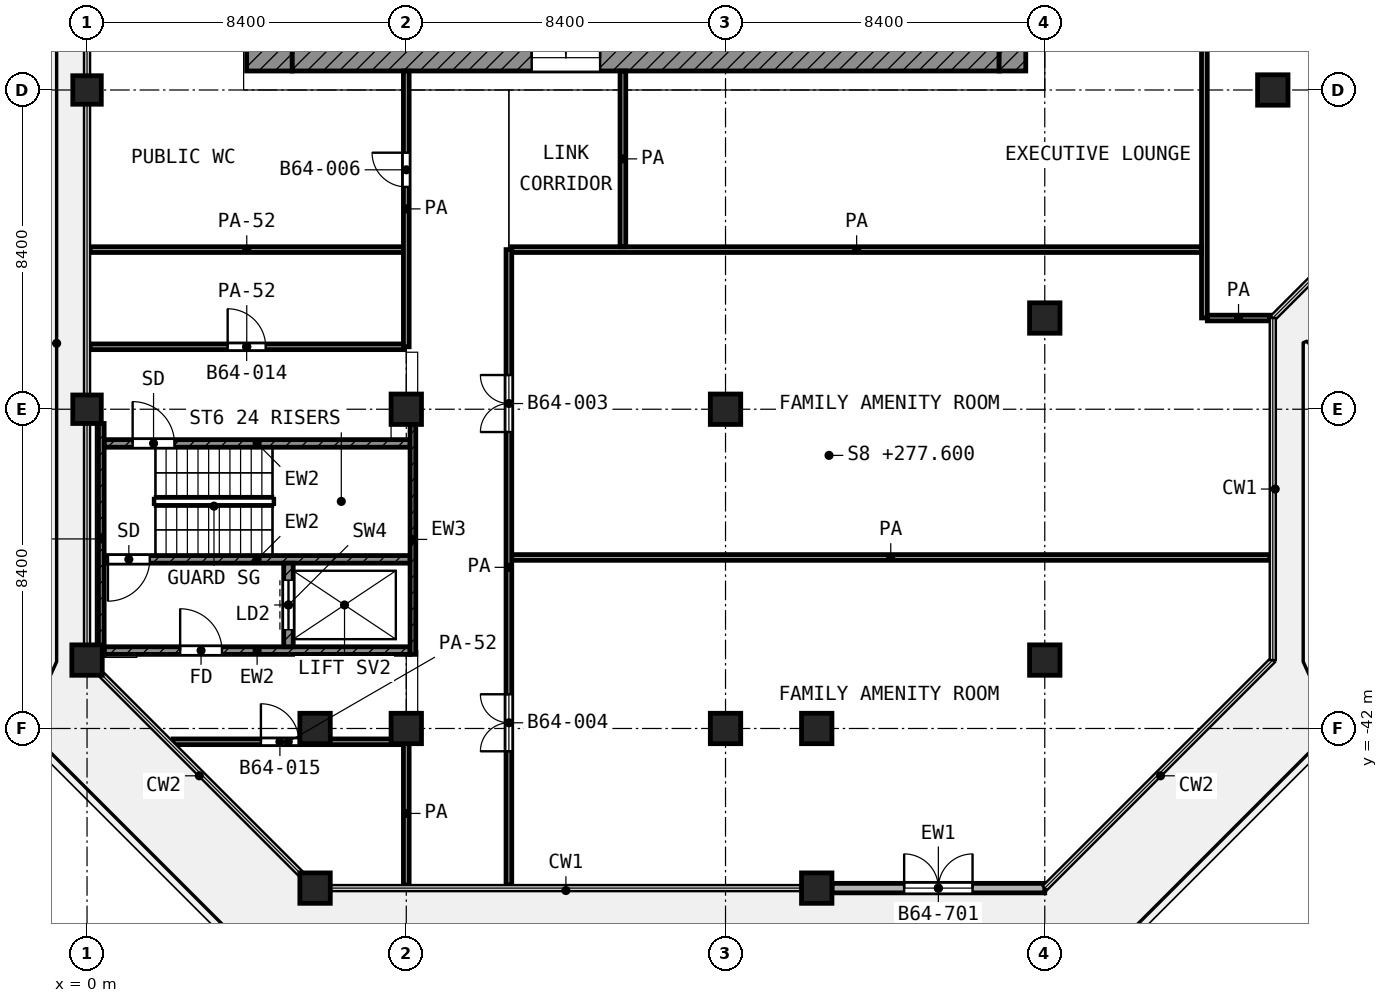
"""IFC4 building model, lengths in metres.
Left out: names, types, materials, properties, quantities, classifications, styles, units other than length and angle.
Written with IfcOpenShell. Run it as: python <this file> out.ifc"""

import sys

from ifc_helpers import new_model, si_unit, direction, frame, frame_2d, origin, origin_2d, place, context, subcontext, project, spatial, rectangle, extrude, element, fill, save


model = new_model("IFC4")
c1 = context("Model", 3, precision=1e-05, world=origin(), true_north=direction((0.0, 1.0)))
c2 = subcontext(c1, "Body", "Model", "MODEL_VIEW")
j1 = project(units=[si_unit("LENGTHUNIT", "METRE"), si_unit("PLANEANGLEUNIT", "RADIAN")], contexts=[c1])
p1 = place(None, origin())
s1 = spatial("IfcSite", under=j1, at=p1, CompositionType="ELEMENT")
p2 = place(p1, origin())
s2 = spatial("IfcBuilding", under=s1, at=p2, CompositionType="ELEMENT")
p3 = place(p2, frame((0.0, 0.0, 277.6)))
s3 = spatial("IfcBuildingStorey", under=s2, at=p3, CompositionType="ELEMENT", Elevation=277.6)
p4 = place(p3, frame((0.0, -25.2, 0.0), z_axis=(0.0, 0.0, 1.0), x_axis=(1.0, 0.0, 0.0)))
e1 = element("IfcColumn", 1, at=p4, inside=s3, PredefinedType="COLUMN", context=c2, shape_type="SweptSolid", body=[
    extrude(rectangle(XDim=0.75, YDim=0.75, at=origin_2d()), origin(), (0.0, 0.0, 1.0), 4.2),
])
for number, where, z_axis, x_axis in (
    (2, (31.2, -25.2, 0.0), (0.0, 0.0, 1.0), (1.0, 0.0, 0.0)),
    (3, (25.2, -31.2, 0.0), (0.0, 0.0, 1.0), (1.0, 0.0, 0.0)),
):
    element("IfcColumn", number, at=place(p3, frame(where, z_axis=z_axis, x_axis=x_axis)), inside=s3, PredefinedType="COLUMN", context=c2, shape_type="SweptSolid", body=[
        extrude(rectangle(XDim=0.8, YDim=0.8, at=origin_2d()), origin(), (0.0, 0.0, 1.0), 4.2),
    ])
p5 = place(p3, frame((0.0, -33.6, 0.0), z_axis=(0.0, 0.0, 1.0), x_axis=(1.0, 0.0, 0.0)))
e4 = element("IfcColumn", 4, at=p5, inside=s3, PredefinedType="COLUMN", context=c2, shape_type="SweptSolid", body=[
    extrude(rectangle(XDim=0.75, YDim=0.75, at=origin_2d()), origin(), (0.0, 0.0, 1.0), 4.2),
])
for number, where, z_axis, x_axis in (
    (5, (8.4, -33.6, 0.0), (0.0, 0.0, 1.0), (1.0, 0.0, 0.0)),
    (6, (16.8, -33.6, 0.0), (0.0, 0.0, 1.0), (1.0, 0.0, 0.0)),
    (7, (0.0, -40.2, 0.0), (0.0, 0.0, 1.0), (1.0, 0.0, 0.0)),
    (8, (25.2, -40.2, 0.0), (0.0, 0.0, 1.0), (1.0, 0.0, 0.0)),
    (9, (6.0, -42.0, 0.0), (0.0, 0.0, 1.0), (1.0, 0.0, 0.0)),
    (10, (8.4, -42.0, 0.0), (0.0, 0.0, 1.0), (1.0, 0.0, 0.0)),
    (11, (16.8, -42.0, 0.0), (0.0, 0.0, 1.0), (1.0, 0.0, 0.0)),
    (12, (19.2, -42.0, 0.0), (0.0, 0.0, 1.0), (1.0, 0.0, 0.0)),
    (13, (6.0, -46.2, 0.0), (0.0, 0.0, 1.0), (1.0, 0.0, 0.0)),
    (14, (19.2, -46.2, 0.0), (0.0, 0.0, 1.0), (1.0, 0.0, 0.0)),
):
    element("IfcColumn", number, at=place(p3, frame(where, z_axis=z_axis, x_axis=x_axis)), inside=s3, PredefinedType="COLUMN", context=c2, shape_type="SweptSolid", body=[
        extrude(rectangle(XDim=0.8, YDim=0.8, at=origin_2d()), origin(), (0.0, 0.0, 1.0), 4.2),
    ])
p6 = place(p3, frame((19.6, -46.2, 0.0), z_axis=(0.0, 0.0, 1.0), x_axis=(1.0, 0.0, 0.0)))
e15 = element("IfcWall", 15, at=p6, inside=s3, PredefinedType="SOLIDWALL", context=c2, shape_type="SweptSolid", body=[
    extrude(rectangle(XDim=5.6, YDim=0.25, at=frame_2d((2.8, 0.0))), origin(), (0.0, 0.0, 1.0), 3.48),
])
p7 = place(p6, frame((1.9, 0.0, 0.0)))
e16 = element("IfcOpeningElement", 16, at=p7, cuts=e15, PredefinedType="OPENING", context=c2, shape_type="SweptSolid", body=[
    extrude(rectangle(XDim=1.8, YDim=2.1, at=frame_2d((0.9, 1.05))), frame((0.0, 0.135, 0.0), z_axis=(0.0, -1.0, 0.0), x_axis=(1.0, 0.0, 0.0)), (0.0, 0.0, 1.0), 0.27),
])
p8 = place(p3, frame((4.8, -24.7, 0.0), z_axis=(0.0, 0.0, 1.0), x_axis=(0.0, 1.0, 0.0)))
e17 = element("IfcWall", 17, at=p8, inside=s3, PredefinedType="SHEAR", context=c2, shape_type="SweptSolid", body=[
    extrude(rectangle(XDim=19.3, YDim=1.2, at=frame_2d((9.65, 0.0))), origin(), (0.0, 0.0, 1.0), 3.6),
])
p9 = place(p8, frame((11.15, 0.0, 0.0)))
e18 = element("IfcOpeningElement", 18, at=p9, cuts=e17, PredefinedType="OPENING", context=c2, shape_type="SweptSolid", body=[
    extrude(rectangle(XDim=1.1, YDim=2.1, at=frame_2d((0.55, 1.05))), frame((0.0, 0.61, 0.0), z_axis=(0.0, -1.0, 0.0), x_axis=(1.0, 0.0, 0.0)), (0.0, 0.0, 1.0), 1.22),
])
p10 = place(p8, frame((1.85, 0.0, 0.0)))
e19 = element("IfcOpeningElement", 19, at=p10, cuts=e17, PredefinedType="OPENING", context=c2, shape_type="SweptSolid", body=[
    extrude(rectangle(XDim=1.1, YDim=2.1, at=frame_2d((0.55, 1.05))), frame((0.0, 0.61, 0.0), z_axis=(0.0, -1.0, 0.0), x_axis=(1.0, 0.0, 0.0)), (0.0, 0.0, 1.0), 1.22),
])
p11 = place(p3, frame((5.4, -24.35, 0.0), z_axis=(0.0, 0.0, 1.0), x_axis=(1.0, 0.0, 0.0)))
e20 = element("IfcWall", 20, at=p11, inside=s3, PredefinedType="SHEAR", context=c2, shape_type="SweptSolid", body=[
    extrude(rectangle(XDim=18.6, YDim=0.7, at=frame_2d((9.3, 0.0))), origin(), (0.0, 0.0, 1.0), 3.6),
])
p12 = place(p11, frame((6.3, 0.0, 0.0)))
e21 = element("IfcOpeningElement", 21, at=p12, cuts=e20, PredefinedType="OPENING", context=c2, shape_type="SweptSolid", body=[
    extrude(rectangle(XDim=1.8, YDim=2.1, at=frame_2d((0.9, 1.05))), frame((0.0, 0.36, 0.0), z_axis=(0.0, -1.0, 0.0), x_axis=(1.0, 0.0, 0.0)), (0.0, 0.0, 1.0), 0.72),
])
p13 = place(p3, frame((24.35, -24.7, 0.0), z_axis=(0.0, 0.0, 1.0), x_axis=(0.0, 1.0, 0.0)))
e22 = element("IfcWall", 22, at=p13, inside=s3, PredefinedType="SHEAR", context=c2, shape_type="SweptSolid", body=[
    extrude(rectangle(XDim=0.7, YDim=0.7, at=frame_2d((0.35, 0.0))), origin(), (0.0, 0.0, 1.0), 3.6),
])
p14 = place(p3, frame((0.375, -40.05, 0.0), z_axis=(0.0, 0.0, 1.0), x_axis=(0.0, 1.0, 0.0)))
e23 = element("IfcWall", 23, at=p14, inside=s3, PredefinedType="SHEAR", context=c2, shape_type="SweptSolid", body=[
    extrude(rectangle(XDim=6.075, YDim=0.15, at=frame_2d((3.038, 0.0))), origin(), (0.0, 0.0, 1.0), 3.6),
])
p15 = place(p3, frame((8.575, -40.05, 0.0), z_axis=(0.0, 0.0, 1.0), x_axis=(0.0, 1.0, 0.0)))
e24 = element("IfcWall", 24, at=p15, inside=s3, PredefinedType="SHEAR", context=c2, shape_type="SweptSolid", body=[
    extrude(rectangle(XDim=6.05, YDim=0.15, at=frame_2d((3.025, 0.0))), origin(), (0.0, 0.0, 1.0), 3.6),
])
p16 = place(p3, frame((0.45, -34.5, 0.0), z_axis=(0.0, 0.0, 1.0), x_axis=(1.0, 0.0, 0.0)))
e25 = element("IfcWall", 25, at=p16, inside=s3, PredefinedType="SHEAR", context=c2, shape_type="SweptSolid", body=[
    extrude(rectangle(XDim=8.05, YDim=0.2, at=frame_2d((4.025, 0.0))), origin(), (0.0, 0.0, 1.0), 3.6),
])
p17 = place(p16, frame((0.75, 0.0, 0.0)))
e26 = element("IfcOpeningElement", 26, at=p17, cuts=e25, PredefinedType="OPENING", context=c2, shape_type="SweptSolid", body=[
    extrude(rectangle(XDim=1.1, YDim=2.1, at=frame_2d((0.55, 1.05))), frame((0.0, 0.11, 0.0), z_axis=(0.0, -1.0, 0.0), x_axis=(1.0, 0.0, 0.0)), (0.0, 0.0, 1.0), 0.22),
])
p18 = place(p3, frame((0.45, -37.55, 0.0), z_axis=(0.0, 0.0, 1.0), x_axis=(1.0, 0.0, 0.0)))
e27 = element("IfcWall", 27, at=p18, inside=s3, PredefinedType="SHEAR", context=c2, shape_type="SweptSolid", body=[
    extrude(rectangle(XDim=8.05, YDim=0.2, at=frame_2d((4.025, 0.0))), origin(), (0.0, 0.0, 1.0), 3.6),
])
p19 = place(p18, frame((0.1, 0.0, 0.0)))
e28 = element("IfcOpeningElement", 28, at=p19, cuts=e27, PredefinedType="OPENING", context=c2, shape_type="SweptSolid", body=[
    extrude(rectangle(XDim=1.1, YDim=2.1, at=frame_2d((0.55, 1.05))), frame((0.0, 0.11, 0.0), z_axis=(0.0, -1.0, 0.0), x_axis=(1.0, 0.0, 0.0)), (0.0, 0.0, 1.0), 0.22),
])
p20 = place(p3, frame((0.45, -39.95, 0.0), z_axis=(0.0, 0.0, 1.0), x_axis=(1.0, 0.0, 0.0)))
e29 = element("IfcWall", 29, at=p20, inside=s3, PredefinedType="SHEAR", context=c2, shape_type="SweptSolid", body=[
    extrude(rectangle(XDim=8.05, YDim=0.2, at=frame_2d((4.025, 0.0))), origin(), (0.0, 0.0, 1.0), 3.6),
])
p21 = place(p20, frame((2.0, 0.0, 0.0)))
e30 = element("IfcOpeningElement", 30, at=p21, cuts=e29, PredefinedType="OPENING", context=c2, shape_type="SweptSolid", body=[
    extrude(rectangle(XDim=1.1, YDim=2.1, at=frame_2d((0.55, 1.05))), frame((0.0, 0.11, 0.0), z_axis=(0.0, -1.0, 0.0), x_axis=(1.0, 0.0, 0.0)), (0.0, 0.0, 1.0), 0.22),
])
p22 = place(p3, frame((5.3, -39.85, 0.0), z_axis=(0.0, 0.0, 1.0), x_axis=(0.0, 1.0, 0.0)))
e31 = element("IfcWall", 31, at=p22, inside=s3, PredefinedType="SHEAR", context=c2, shape_type="SweptSolid", body=[
    extrude(rectangle(XDim=2.2, YDim=0.25, at=frame_2d((1.1, 0.0))), origin(), (0.0, 0.0, 1.0), 3.6),
])
p23 = place(p22, frame((0.45, 0.0, 0.0)))
e32 = element("IfcOpeningElement", 32, at=p23, cuts=e31, PredefinedType="OPENING", context=c2, shape_type="SweptSolid", body=[
    extrude(rectangle(XDim=1.3, YDim=2.1, at=frame_2d((0.65, 1.05))), frame((0.0, 0.135, 0.0), z_axis=(0.0, -1.0, 0.0), x_axis=(1.0, 0.0, 0.0)), (0.0, 0.0, 1.0), 0.27),
])
p24 = place(p3, frame((2.263, -42.35, 0.0), z_axis=(0.0, 0.0, 1.0), x_axis=(1.0, 0.0, 0.0)))
e33 = element("IfcWall", 33, at=p24, inside=s3, PredefinedType="PARTITIONING", context=c2, shape_type="SweptSolid", body=[
    extrude(rectangle(XDim=6.062, YDim=0.15, at=frame_2d((3.031, 0.0))), origin(), (0.0, 0.0, 1.0), 2.7),
])
p25 = place(p24, frame((2.312, 0.0, 0.0)))
e34 = element("IfcOpeningElement", 34, at=p25, cuts=e33, PredefinedType="OPENING", context=c2, shape_type="SweptSolid", body=[
    extrude(rectangle(XDim=1.0, YDim=2.1, at=frame_2d((0.5, 1.05))), frame((0.0, 0.085, 0.0), z_axis=(0.0, -1.0, 0.0), x_axis=(1.0, 0.0, 0.0)), (0.0, 0.0, 1.0), 0.17),
])
p26 = place(p3, frame((11.175, -37.5, 0.0), z_axis=(0.0, 0.0, 1.0), x_axis=(1.0, 0.0, 0.0)))
e35 = element("IfcWall", 35, at=p26, inside=s3, PredefinedType="PARTITIONING", context=c2, shape_type="SweptSolid", body=[
    extrude(rectangle(XDim=19.945, YDim=0.15, at=frame_2d((9.973, 0.0))), origin(), (0.0, 0.0, 1.0), 3.6),
])
p27 = place(p3, frame((0.08, -31.957, 0.0), z_axis=(0.0, 0.0, 1.0), x_axis=(1.0, 0.0, 0.0)))
e36 = element("IfcWall", 36, at=p27, inside=s3, PredefinedType="PARTITIONING", context=c2, shape_type="SweptSolid", body=[
    extrude(rectangle(XDim=8.245, YDim=0.15, at=frame_2d((4.123, 0.0))), origin(), (0.0, 0.0, 1.0), 2.7),
])
p28 = place(p27, frame((3.62, 0.0, 0.0)))
e37 = element("IfcOpeningElement", 37, at=p28, cuts=e36, PredefinedType="OPENING", context=c2, shape_type="SweptSolid", body=[
    extrude(rectangle(XDim=1.0, YDim=2.1, at=frame_2d((0.5, 1.05))), frame((0.0, 0.085, 0.0), z_axis=(0.0, -1.0, 0.0), x_axis=(1.0, 0.0, 0.0)), (0.0, 0.0, 1.0), 0.17),
])
p29 = place(p3, frame((29.477, -31.2, 0.0), z_axis=(0.0, 0.0, 1.0), x_axis=(1.0, 0.0, 0.0)))
e38 = element("IfcWall", 38, at=p29, inside=s3, PredefinedType="PARTITIONING", context=c2, shape_type="SweptSolid", body=[
    extrude(rectangle(XDim=1.643, YDim=0.15, at=frame_2d((0.822, 0.0))), origin(), (0.0, 0.0, 1.0), 3.6),
])
p30 = place(p3, frame((0.08, -29.4, 0.0), z_axis=(0.0, 0.0, 1.0), x_axis=(1.0, 0.0, 0.0)))
e39 = element("IfcWall", 39, at=p30, inside=s3, PredefinedType="PARTITIONING", context=c2, shape_type="SweptSolid", body=[
    extrude(rectangle(XDim=8.245, YDim=0.15, at=frame_2d((4.123, 0.0))), origin(), (0.0, 0.0, 1.0), 2.7),
])
p31 = place(p3, frame((11.175, -29.4, 0.0), z_axis=(0.0, 0.0, 1.0), x_axis=(1.0, 0.0, 0.0)))
e40 = element("IfcWall", 40, at=p31, inside=s3, PredefinedType="PARTITIONING", context=c2, shape_type="SweptSolid", body=[
    extrude(rectangle(XDim=18.15, YDim=0.15, at=frame_2d((9.075, 0.0))), origin(), (0.0, 0.0, 1.0), 3.6),
])
p32 = place(p3, frame((8.4, -46.12, 0.0), z_axis=(0.0, 0.0, 1.0), x_axis=(0.0, 1.0, 0.0)))
e41 = element("IfcWall", 41, at=p32, inside=s3, PredefinedType="PARTITIONING", context=c2, shape_type="SweptSolid", body=[
    extrude(rectangle(XDim=3.77, YDim=0.15, at=frame_2d((1.885, 0.0))), origin(), (0.0, 0.0, 1.0), 3.6),
])
p33 = place(p3, frame((8.4, -31.957, 0.0), z_axis=(0.0, 0.0, 1.0), x_axis=(0.0, 1.0, 0.0)))
e42 = element("IfcWall", 42, at=p33, inside=s3, PredefinedType="PARTITIONING", context=c2, shape_type="SweptSolid", body=[
    extrude(rectangle(XDim=7.257, YDim=0.15, at=frame_2d((3.628, 0.0))), origin(), (0.0, 0.0, 1.0), 3.6),
])
p34 = place(p33, frame((4.207, 0.0, 0.0)))
e43 = element("IfcOpeningElement", 43, at=p34, cuts=e42, PredefinedType="OPENING", context=c2, shape_type="SweptSolid", body=[
    extrude(rectangle(XDim=0.9, YDim=2.1, at=frame_2d((0.45, 1.05))), frame((0.0, 0.085, 0.0), z_axis=(0.0, -1.0, 0.0), x_axis=(1.0, 0.0, 0.0)), (0.0, 0.0, 1.0), 0.17),
])
p35 = place(p3, frame((11.1, -46.12, 0.0), z_axis=(0.0, 0.0, 1.0), x_axis=(0.0, 1.0, 0.0)))
e44 = element("IfcWall", 44, at=p35, inside=s3, PredefinedType="PARTITIONING", context=c2, shape_type="SweptSolid", body=[
    extrude(rectangle(XDim=16.72, YDim=0.15, at=frame_2d((8.36, 0.0))), origin(), (0.0, 0.0, 1.0), 3.6),
])
p36 = place(p35, frame((11.92, 0.0, 0.0)))
e45 = element("IfcOpeningElement", 45, at=p36, cuts=e44, PredefinedType="OPENING", context=c2, shape_type="SweptSolid", body=[
    extrude(rectangle(XDim=1.5, YDim=2.1, at=frame_2d((0.75, 1.05))), frame((0.0, 0.085, 0.0), z_axis=(0.0, -1.0, 0.0), x_axis=(1.0, 0.0, 0.0)), (0.0, 0.0, 1.0), 0.17),
])
p37 = place(p35, frame((3.52, 0.0, 0.0)))
e46 = element("IfcOpeningElement", 46, at=p37, cuts=e44, PredefinedType="OPENING", context=c2, shape_type="SweptSolid", body=[
    extrude(rectangle(XDim=1.5, YDim=2.1, at=frame_2d((0.75, 1.05))), frame((0.0, 0.085, 0.0), z_axis=(0.0, -1.0, 0.0), x_axis=(1.0, 0.0, 0.0)), (0.0, 0.0, 1.0), 0.17),
])
p38 = place(p3, frame((14.1, -29.325, 0.0), z_axis=(0.0, 0.0, 1.0), x_axis=(0.0, 1.0, 0.0)))
e47 = element("IfcWall", 47, at=p38, inside=s3, PredefinedType="PARTITIONING", context=c2, shape_type="SweptSolid", body=[
    extrude(rectangle(XDim=4.625, YDim=0.15, at=frame_2d((2.312, 0.0))), origin(), (0.0, 0.0, 1.0), 3.6),
])
p39 = place(p3, frame((29.4, -31.198, 0.0), z_axis=(0.0, 0.0, 1.0), x_axis=(0.0, 1.0, 0.0)))
e48 = element("IfcWall", 48, at=p39, inside=s3, PredefinedType="PARTITIONING", context=c2, shape_type="SweptSolid", body=[
    extrude(rectangle(XDim=20.098, YDim=0.15, at=frame_2d((10.049, 0.0))), origin(), (0.0, 0.0, 1.0), 3.6),
])
p40 = place(p7, origin())
e49 = element("IfcDoor", 49, at=p40, inside=s3, OperationType="DOUBLE_DOOR_SINGLE_SWING", PredefinedType="DOOR", context=c2, shape_type="SweptSolid", body=[
    extrude(rectangle(XDim=1.8, YDim=2.1, at=frame_2d((0.9, 1.05))), frame((0.0, 0.025, 0.0), z_axis=(0.0, -1.0, 0.0), x_axis=(1.0, 0.0, 0.0)), (0.0, 0.0, 1.0), 0.05),
])
fill(e16, e49)
p41 = place(p12, origin())
e50 = element("IfcDoor", 50, at=p41, inside=s3, OperationType="DOUBLE_DOOR_SINGLE_SWING", PredefinedType="DOOR", context=c2, shape_type="SweptSolid", body=[
    extrude(rectangle(XDim=1.8, YDim=2.1, at=frame_2d((0.9, 1.05))), frame((0.0, 0.025, 0.0), z_axis=(0.0, -1.0, 0.0), x_axis=(1.0, 0.0, 0.0)), (0.0, 0.0, 1.0), 0.05),
])
fill(e21, e50)
p42 = place(p17, origin())
e51 = element("IfcDoor", 51, at=p42, inside=s3, OperationType="SINGLE_SWING_LEFT", PredefinedType="DOOR", context=c2, shape_type="SweptSolid", body=[
    extrude(rectangle(XDim=1.1, YDim=2.1, at=frame_2d((0.55, 1.05))), frame((0.0, 0.025, 0.0), z_axis=(0.0, -1.0, 0.0), x_axis=(1.0, 0.0, 0.0)), (0.0, 0.0, 1.0), 0.05),
])
fill(e26, e51)
p43 = place(p19, frame((1.1, 0.0, 0.0), z_axis=(0.0, 0.0, 1.0), x_axis=(-1.0, 0.0, 0.0)))
e52 = element("IfcDoor", 52, at=p43, inside=s3, OperationType="SINGLE_SWING_LEFT", PredefinedType="DOOR", context=c2, shape_type="SweptSolid", body=[
    extrude(rectangle(XDim=1.1, YDim=2.1, at=frame_2d((0.55, 1.05))), frame((0.0, 0.025, 0.0), z_axis=(0.0, -1.0, 0.0), x_axis=(1.0, 0.0, 0.0)), (0.0, 0.0, 1.0), 0.05),
])
fill(e28, e52)
p44 = place(p23, origin())
e53 = element("IfcDoor", 53, at=p44, inside=s3, OperationType="DOUBLE_DOOR_SLIDING", PredefinedType="DOOR", context=c2, shape_type="SweptSolid", body=[
    extrude(rectangle(XDim=1.3, YDim=2.1, at=frame_2d((0.65, 1.05))), frame((0.0, 0.025, 0.0), z_axis=(0.0, -1.0, 0.0), x_axis=(1.0, 0.0, 0.0)), (0.0, 0.0, 1.0), 0.05),
])
fill(e32, e53)
p45 = place(p21, origin())
e54 = element("IfcDoor", 54, at=p45, inside=s3, OperationType="SINGLE_SWING_LEFT", PredefinedType="DOOR", context=c2, shape_type="SweptSolid", body=[
    extrude(rectangle(XDim=1.1, YDim=2.1, at=frame_2d((0.55, 1.05))), frame((0.0, 0.025, 0.0), z_axis=(0.0, -1.0, 0.0), x_axis=(1.0, 0.0, 0.0)), (0.0, 0.0, 1.0), 0.05),
])
fill(e30, e54)
p46 = place(p34, origin())
e55 = element("IfcDoor", 55, at=p46, inside=s3, OperationType="SINGLE_SWING_RIGHT", PredefinedType="DOOR", context=c2, shape_type="SweptSolid", body=[
    extrude(rectangle(XDim=0.9, YDim=2.1, at=frame_2d((0.45, 1.05))), frame((0.0, 0.025, 0.0), z_axis=(0.0, -1.0, 0.0), x_axis=(1.0, 0.0, 0.0)), (0.0, 0.0, 1.0), 0.05),
])
fill(e43, e55)
p47 = place(p28, origin())
e56 = element("IfcDoor", 56, at=p47, inside=s3, OperationType="SINGLE_SWING_LEFT", PredefinedType="DOOR", context=c2, shape_type="SweptSolid", body=[
    extrude(rectangle(XDim=1.0, YDim=2.1, at=frame_2d((0.5, 1.05))), frame((0.0, 0.025, 0.0), z_axis=(0.0, -1.0, 0.0), x_axis=(1.0, 0.0, 0.0)), (0.0, 0.0, 1.0), 0.05),
])
fill(e37, e56)
p48 = place(p25, origin())
e57 = element("IfcDoor", 57, at=p48, inside=s3, OperationType="SINGLE_SWING_LEFT", PredefinedType="DOOR", context=c2, shape_type="SweptSolid", body=[
    extrude(rectangle(XDim=1.0, YDim=2.1, at=frame_2d((0.5, 1.05))), frame((0.0, 0.025, 0.0), z_axis=(0.0, -1.0, 0.0), x_axis=(1.0, 0.0, 0.0)), (0.0, 0.0, 1.0), 0.05),
])
fill(e34, e57)
p49 = place(p36, origin())
e58 = element("IfcDoor", 58, at=p49, inside=s3, OperationType="DOUBLE_DOOR_SINGLE_SWING", PredefinedType="DOOR", context=c2, shape_type="SweptSolid", body=[
    extrude(rectangle(XDim=1.5, YDim=2.1, at=frame_2d((0.75, 1.05))), frame((0.0, 0.025, 0.0), z_axis=(0.0, -1.0, 0.0), x_axis=(1.0, 0.0, 0.0)), (0.0, 0.0, 1.0), 0.05),
])
fill(e45, e58)
p50 = place(p37, origin())
e59 = element("IfcDoor", 59, at=p50, inside=s3, OperationType="DOUBLE_DOOR_SINGLE_SWING", PredefinedType="DOOR", context=c2, shape_type="SweptSolid", body=[
    extrude(rectangle(XDim=1.5, YDim=2.1, at=frame_2d((0.75, 1.05))), frame((0.0, 0.025, 0.0), z_axis=(0.0, -1.0, 0.0), x_axis=(1.0, 0.0, 0.0)), (0.0, 0.0, 1.0), 0.05),
])
fill(e46, e59)
save(model, sys.argv[1])
